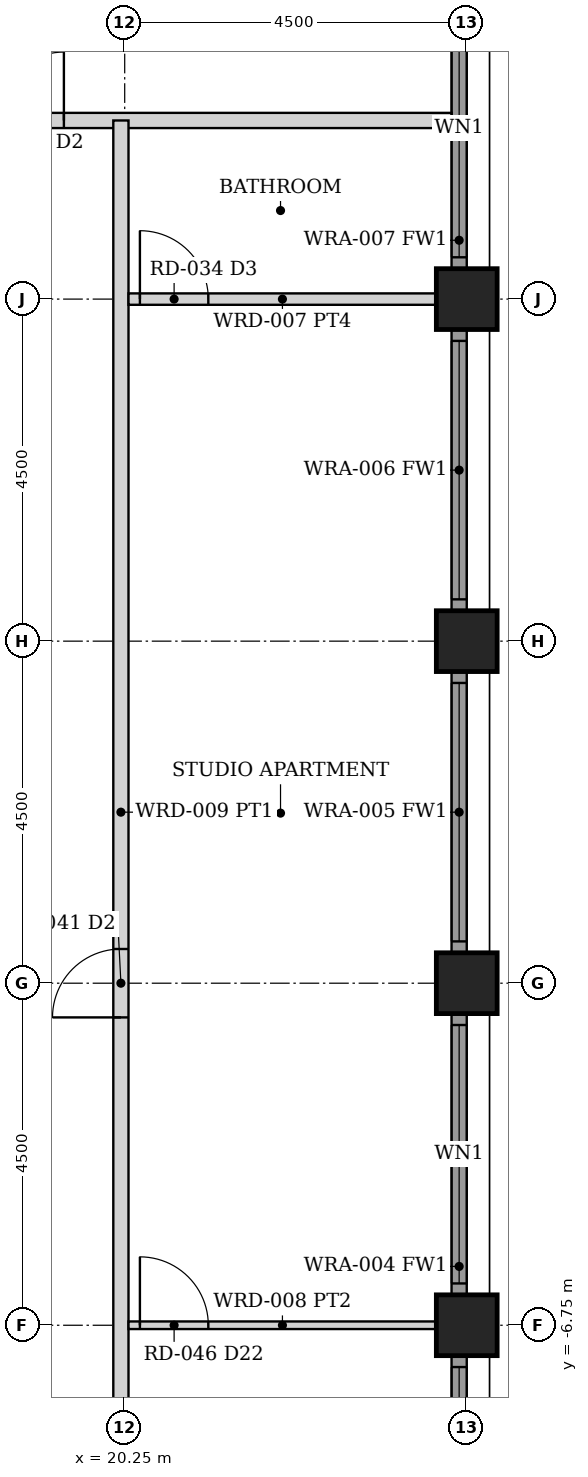
"""IFC4 building model, lengths in metres.
Left out: names, types, materials, properties, quantities, classifications, styles, units other than length and angle.
Written with IfcOpenShell. Run it as: python <this file> out.ifc"""

import sys

from ifc_helpers import new_model, si_unit, direction, frame, frame_2d, origin, origin_2d, place, context, subcontext, project, spatial, rectangle, hollow_rectangle, extrude, element, fill, save


model = new_model("IFC4")
c1 = context("Model", 3, precision=1e-05, world=origin(), true_north=direction((0.0, 1.0)))
c2 = subcontext(c1, "Body", "Model", "MODEL_VIEW")
j1 = project(units=[si_unit("LENGTHUNIT", "METRE"), si_unit("PLANEANGLEUNIT", "RADIAN")], contexts=[c1])
p1 = place(None, origin())
s1 = spatial("IfcSite", under=j1, at=p1, CompositionType="ELEMENT")
p2 = place(p1, origin())
s2 = spatial("IfcBuilding", under=s1, at=p2, CompositionType="ELEMENT")
p3 = place(p2, frame((0.0, 0.0, 58.0)))
s3 = spatial("IfcBuildingStorey", under=s2, at=p3, CompositionType="ELEMENT", Elevation=58.0)
for number, where, z_axis, x_axis in (
    (1, (24.75, -6.75, 0.0), (0.0, 0.0, 1.0), (1.0, 0.0, 0.0)),
    (2, (24.75, -2.25, 0.0), (0.0, 0.0, 1.0), (1.0, 0.0, 0.0)),
    (3, (24.75, 2.25, 0.0), (0.0, 0.0, 1.0), (1.0, 0.0, 0.0)),
    (4, (24.75, 6.75, 0.0), (0.0, 0.0, 1.0), (1.0, 0.0, 0.0)),
):
    element("IfcColumn", number, at=place(p3, frame(where, z_axis=z_axis, x_axis=x_axis)), inside=s3, PredefinedType="COLUMN", context=c2, shape_type="SweptSolid", body=[
        extrude(hollow_rectangle(XDim=0.8, YDim=0.8, WallThickness=0.06, at=origin_2d()), origin(), (0.0, 0.0, 1.0), 3.5),
    ])
p4 = place(p3, frame((24.65, -10.845, 0.0), z_axis=(0.0, 0.0, 1.0), x_axis=(0.0, 1.0, 0.0)))
e5 = element("IfcWall", 5, at=p4, inside=s3, PredefinedType="SOLIDWALL", context=c2, shape_type="SweptSolid", body=[
    extrude(rectangle(XDim=3.69, YDim=0.2, at=frame_2d((1.845, 0.0))), origin(), (0.0, 0.0, 1.0), 2.379),
])
p5 = place(p4, frame((0.145, 0.0, 0.3)))
e6 = element("IfcOpeningElement", 6, at=p5, cuts=e5, PredefinedType="OPENING", context=c2, shape_type="SweptSolid", body=[
    extrude(rectangle(XDim=3.4, YDim=1.929, at=frame_2d((1.7, 0.964))), frame((0.0, 0.11, 0.0), z_axis=(0.0, -1.0, 0.0), x_axis=(1.0, 0.0, 0.0)), (0.0, 0.0, 1.0), 0.22),
])
p6 = place(p3, frame((24.65, -6.345, 0.0), z_axis=(0.0, 0.0, 1.0), x_axis=(0.0, 1.0, 0.0)))
e7 = element("IfcWall", 7, at=p6, inside=s3, PredefinedType="SOLIDWALL", context=c2, shape_type="SweptSolid", body=[
    extrude(rectangle(XDim=3.69, YDim=0.2, at=frame_2d((1.845, 0.0))), origin(), (0.0, 0.0, 1.0), 2.379),
])
p7 = place(p6, frame((0.145, 0.0, 0.3)))
e8 = element("IfcOpeningElement", 8, at=p7, cuts=e7, PredefinedType="OPENING", context=c2, shape_type="SweptSolid", body=[
    extrude(rectangle(XDim=3.4, YDim=1.929, at=frame_2d((1.7, 0.964))), frame((0.0, 0.11, 0.0), z_axis=(0.0, -1.0, 0.0), x_axis=(1.0, 0.0, 0.0)), (0.0, 0.0, 1.0), 0.22),
])
p8 = place(p3, frame((24.65, -1.845, 0.0), z_axis=(0.0, 0.0, 1.0), x_axis=(0.0, 1.0, 0.0)))
e9 = element("IfcWall", 9, at=p8, inside=s3, PredefinedType="SOLIDWALL", context=c2, shape_type="SweptSolid", body=[
    extrude(rectangle(XDim=3.69, YDim=0.2, at=frame_2d((1.845, 0.0))), origin(), (0.0, 0.0, 1.0), 2.379),
])
p9 = place(p8, frame((0.145, 0.0, 0.3)))
e10 = element("IfcOpeningElement", 10, at=p9, cuts=e9, PredefinedType="OPENING", context=c2, shape_type="SweptSolid", body=[
    extrude(rectangle(XDim=3.4, YDim=1.929, at=frame_2d((1.7, 0.964))), frame((0.0, 0.11, 0.0), z_axis=(0.0, -1.0, 0.0), x_axis=(1.0, 0.0, 0.0)), (0.0, 0.0, 1.0), 0.22),
])
p10 = place(p3, frame((24.65, 2.655, 0.0), z_axis=(0.0, 0.0, 1.0), x_axis=(0.0, 1.0, 0.0)))
e11 = element("IfcWall", 11, at=p10, inside=s3, PredefinedType="SOLIDWALL", context=c2, shape_type="SweptSolid", body=[
    extrude(rectangle(XDim=3.69, YDim=0.2, at=frame_2d((1.845, 0.0))), origin(), (0.0, 0.0, 1.0), 2.379),
])
p11 = place(p10, frame((0.145, 0.0, 0.3)))
e12 = element("IfcOpeningElement", 12, at=p11, cuts=e11, PredefinedType="OPENING", context=c2, shape_type="SweptSolid", body=[
    extrude(rectangle(XDim=3.4, YDim=1.929, at=frame_2d((1.7, 0.964))), frame((0.0, 0.11, 0.0), z_axis=(0.0, -1.0, 0.0), x_axis=(1.0, 0.0, 0.0)), (0.0, 0.0, 1.0), 0.22),
])
p12 = place(p3, frame((24.65, 7.155, 0.0), z_axis=(0.0, 0.0, 1.0), x_axis=(0.0, 1.0, 0.0)))
e13 = element("IfcWall", 13, at=p12, inside=s3, PredefinedType="SOLIDWALL", context=c2, shape_type="SweptSolid", body=[
    extrude(rectangle(XDim=3.69, YDim=0.2, at=frame_2d((1.845, 0.0))), origin(), (0.0, 0.0, 1.0), 2.379),
])
p13 = place(p12, frame((0.145, 0.0, 0.3)))
e14 = element("IfcOpeningElement", 14, at=p13, cuts=e13, PredefinedType="OPENING", context=c2, shape_type="SweptSolid", body=[
    extrude(rectangle(XDim=3.4, YDim=1.929, at=frame_2d((1.7, 0.964))), frame((0.0, 0.11, 0.0), z_axis=(0.0, -1.0, 0.0), x_axis=(1.0, 0.0, 0.0)), (0.0, 0.0, 1.0), 0.22),
])
p14 = place(p3, frame((-24.55, 9.1, 0.0), z_axis=(0.0, 0.0, 1.0), x_axis=(1.0, 0.0, 0.0)))
e15 = element("IfcWall", 15, at=p14, inside=s3, PredefinedType="PARTITIONING", context=c2, shape_type="SweptSolid", body=[
    extrude(rectangle(XDim=49.1, YDim=0.2, at=frame_2d((24.55, 0.0))), origin(), (0.0, 0.0, 1.0), 2.373),
])
p15 = place(p14, frame((5.1, 0.0, 0.0)))
e16 = element("IfcOpeningElement", 16, at=p15, cuts=e15, PredefinedType="OPENING", context=c2, shape_type="SweptSolid", body=[
    extrude(rectangle(XDim=0.9, YDim=2.1, at=frame_2d((0.45, 1.05))), frame((0.0, 0.11, 0.0), z_axis=(0.0, -1.0, 0.0), x_axis=(1.0, 0.0, 0.0)), (0.0, 0.0, 1.0), 0.22),
])
p16 = place(p14, frame((13.5, 0.0, 0.0)))
e17 = element("IfcOpeningElement", 17, at=p16, cuts=e15, PredefinedType="OPENING", context=c2, shape_type="SweptSolid", body=[
    extrude(rectangle(XDim=0.9, YDim=2.1, at=frame_2d((0.45, 1.05))), frame((0.0, 0.11, 0.0), z_axis=(0.0, -1.0, 0.0), x_axis=(1.0, 0.0, 0.0)), (0.0, 0.0, 1.0), 0.22),
])
p17 = place(p14, frame((18.1, 0.0, 0.0)))
e18 = element("IfcOpeningElement", 18, at=p17, cuts=e15, PredefinedType="OPENING", context=c2, shape_type="SweptSolid", body=[
    extrude(rectangle(XDim=0.9, YDim=2.1, at=frame_2d((0.45, 1.05))), frame((0.0, 0.11, 0.0), z_axis=(0.0, -1.0, 0.0), x_axis=(1.0, 0.0, 0.0)), (0.0, 0.0, 1.0), 0.22),
])
p18 = place(p14, frame((31.5, 0.0, 0.0)))
e19 = element("IfcOpeningElement", 19, at=p18, cuts=e15, PredefinedType="OPENING", context=c2, shape_type="SweptSolid", body=[
    extrude(rectangle(XDim=0.9, YDim=2.1, at=frame_2d((0.45, 1.05))), frame((0.0, 0.11, 0.0), z_axis=(0.0, -1.0, 0.0), x_axis=(1.0, 0.0, 0.0)), (0.0, 0.0, 1.0), 0.22),
])
p19 = place(p14, frame((43.1, 0.0, 0.0)))
e20 = element("IfcOpeningElement", 20, at=p19, cuts=e15, PredefinedType="OPENING", context=c2, shape_type="SweptSolid", body=[
    extrude(rectangle(XDim=0.9, YDim=2.1, at=frame_2d((0.45, 1.05))), frame((0.0, 0.11, 0.0), z_axis=(0.0, -1.0, 0.0), x_axis=(1.0, 0.0, 0.0)), (0.0, 0.0, 1.0), 0.22),
])
p20 = place(p3, frame((20.2, -9.1, 0.0), z_axis=(0.0, 0.0, 1.0), x_axis=(0.0, 1.0, 0.0)))
e21 = element("IfcWall", 21, at=p20, inside=s3, PredefinedType="PARTITIONING", context=c2, shape_type="SweptSolid", body=[
    extrude(rectangle(XDim=18.2, YDim=0.2, at=frame_2d((9.1, 0.0))), origin(), (0.0, 0.0, 1.0), 2.373),
])
p21 = place(p20, frame((6.4, 0.0, 0.0)))
e22 = element("IfcOpeningElement", 22, at=p21, cuts=e21, PredefinedType="OPENING", context=c2, shape_type="SweptSolid", body=[
    extrude(rectangle(XDim=0.9, YDim=2.1, at=frame_2d((0.45, 1.05))), frame((0.0, 0.11, 0.0), z_axis=(0.0, -1.0, 0.0), x_axis=(1.0, 0.0, 0.0)), (0.0, 0.0, 1.0), 0.22),
])
p22 = place(p3, frame((20.3, -6.75, 0.0), z_axis=(0.0, 0.0, 1.0), x_axis=(1.0, 0.0, 0.0)))
e23 = element("IfcWall", 23, at=p22, inside=s3, PredefinedType="PARTITIONING", context=c2, shape_type="SweptSolid", body=[
    extrude(rectangle(XDim=4.05, YDim=0.1, at=frame_2d((2.025, 0.0))), origin(), (0.0, 0.0, 1.0), 2.373),
])
p23 = place(p22, frame((0.15, 0.0, 0.0)))
e24 = element("IfcOpeningElement", 24, at=p23, cuts=e23, PredefinedType="OPENING", context=c2, shape_type="SweptSolid", body=[
    extrude(rectangle(XDim=0.9, YDim=2.1, at=frame_2d((0.45, 1.05))), frame((0.0, 0.06, 0.0), z_axis=(0.0, -1.0, 0.0), x_axis=(1.0, 0.0, 0.0)), (0.0, 0.0, 1.0), 0.12),
])
p24 = place(p3, frame((20.3, 6.75, 0.0), z_axis=(0.0, 0.0, 1.0), x_axis=(1.0, 0.0, 0.0)))
e25 = element("IfcWall", 25, at=p24, inside=s3, PredefinedType="PARTITIONING", context=c2, shape_type="SweptSolid", body=[
    extrude(rectangle(XDim=4.05, YDim=0.15, at=frame_2d((2.025, 0.0))), origin(), (0.0, 0.0, 1.0), 2.373),
])
p25 = place(p24, frame((0.15, 0.0, 0.0)))
e26 = element("IfcOpeningElement", 26, at=p25, cuts=e25, PredefinedType="OPENING", context=c2, shape_type="SweptSolid", body=[
    extrude(rectangle(XDim=0.9, YDim=2.1, at=frame_2d((0.45, 1.05))), frame((0.0, 0.085, 0.0), z_axis=(0.0, -1.0, 0.0), x_axis=(1.0, 0.0, 0.0)), (0.0, 0.0, 1.0), 0.17),
])
p26 = place(p5, origin())
e27 = element("IfcWindow", 27, at=p26, inside=s3, PartitioningType="SINGLE_PANEL", PredefinedType="WINDOW", context=c2, shape_type="SweptSolid", body=[
    extrude(rectangle(XDim=3.4, YDim=1.929, at=frame_2d((1.7, 0.964))), frame((0.0, 0.03, 0.0), z_axis=(0.0, -1.0, 0.0), x_axis=(1.0, 0.0, 0.0)), (0.0, 0.0, 1.0), 0.06),
])
fill(e6, e27)
p27 = place(p7, origin())
e28 = element("IfcWindow", 28, at=p27, inside=s3, PartitioningType="SINGLE_PANEL", PredefinedType="WINDOW", context=c2, shape_type="SweptSolid", body=[
    extrude(rectangle(XDim=3.4, YDim=1.929, at=frame_2d((1.7, 0.964))), frame((0.0, 0.03, 0.0), z_axis=(0.0, -1.0, 0.0), x_axis=(1.0, 0.0, 0.0)), (0.0, 0.0, 1.0), 0.06),
])
fill(e8, e28)
p28 = place(p9, origin())
e29 = element("IfcWindow", 29, at=p28, inside=s3, PartitioningType="SINGLE_PANEL", PredefinedType="WINDOW", context=c2, shape_type="SweptSolid", body=[
    extrude(rectangle(XDim=3.4, YDim=1.929, at=frame_2d((1.7, 0.964))), frame((0.0, 0.03, 0.0), z_axis=(0.0, -1.0, 0.0), x_axis=(1.0, 0.0, 0.0)), (0.0, 0.0, 1.0), 0.06),
])
fill(e10, e29)
p29 = place(p11, origin())
e30 = element("IfcWindow", 30, at=p29, inside=s3, PartitioningType="SINGLE_PANEL", PredefinedType="WINDOW", context=c2, shape_type="SweptSolid", body=[
    extrude(rectangle(XDim=3.4, YDim=1.929, at=frame_2d((1.7, 0.964))), frame((0.0, 0.03, 0.0), z_axis=(0.0, -1.0, 0.0), x_axis=(1.0, 0.0, 0.0)), (0.0, 0.0, 1.0), 0.06),
])
fill(e12, e30)
p30 = place(p13, origin())
e31 = element("IfcWindow", 31, at=p30, inside=s3, PartitioningType="SINGLE_PANEL", PredefinedType="WINDOW", context=c2, shape_type="SweptSolid", body=[
    extrude(rectangle(XDim=3.4, YDim=1.929, at=frame_2d((1.7, 0.964))), frame((0.0, 0.03, 0.0), z_axis=(0.0, -1.0, 0.0), x_axis=(1.0, 0.0, 0.0)), (0.0, 0.0, 1.0), 0.06),
])
fill(e14, e31)
p31 = place(p19, origin())
e32 = element("IfcDoor", 32, at=p31, inside=s3, OperationType="SINGLE_SWING_RIGHT", PredefinedType="DOOR", context=c2, shape_type="SweptSolid", body=[
    extrude(rectangle(XDim=0.9, YDim=2.1, at=frame_2d((0.45, 1.05))), frame((0.0, 0.025, 0.0), z_axis=(0.0, -1.0, 0.0), x_axis=(1.0, 0.0, 0.0)), (0.0, 0.0, 1.0), 0.05),
])
fill(e20, e32)
p32 = place(p23, origin())
e33 = element("IfcDoor", 33, at=p32, inside=s3, OperationType="SINGLE_SWING_LEFT", PredefinedType="DOOR", context=c2, shape_type="SweptSolid", body=[
    extrude(rectangle(XDim=0.9, YDim=2.1, at=frame_2d((0.45, 1.05))), frame((0.0, 0.025, 0.0), z_axis=(0.0, -1.0, 0.0), x_axis=(1.0, 0.0, 0.0)), (0.0, 0.0, 1.0), 0.05),
])
fill(e24, e33)
p33 = place(p25, origin())
e34 = element("IfcDoor", 34, at=p33, inside=s3, OperationType="SINGLE_SWING_LEFT", PredefinedType="DOOR", context=c2, shape_type="SweptSolid", body=[
    extrude(rectangle(XDim=0.9, YDim=2.1, at=frame_2d((0.45, 1.05))), frame((0.0, 0.025, 0.0), z_axis=(0.0, -1.0, 0.0), x_axis=(1.0, 0.0, 0.0)), (0.0, 0.0, 1.0), 0.05),
])
fill(e26, e34)
p34 = place(p21, origin())
e35 = element("IfcDoor", 35, at=p34, inside=s3, OperationType="SINGLE_SWING_LEFT", PredefinedType="DOOR", context=c2, shape_type="SweptSolid", body=[
    extrude(rectangle(XDim=0.9, YDim=2.1, at=frame_2d((0.45, 1.05))), frame((0.0, 0.025, 0.0), z_axis=(0.0, -1.0, 0.0), x_axis=(1.0, 0.0, 0.0)), (0.0, 0.0, 1.0), 0.05),
])
fill(e22, e35)
save(model, sys.argv[1])
